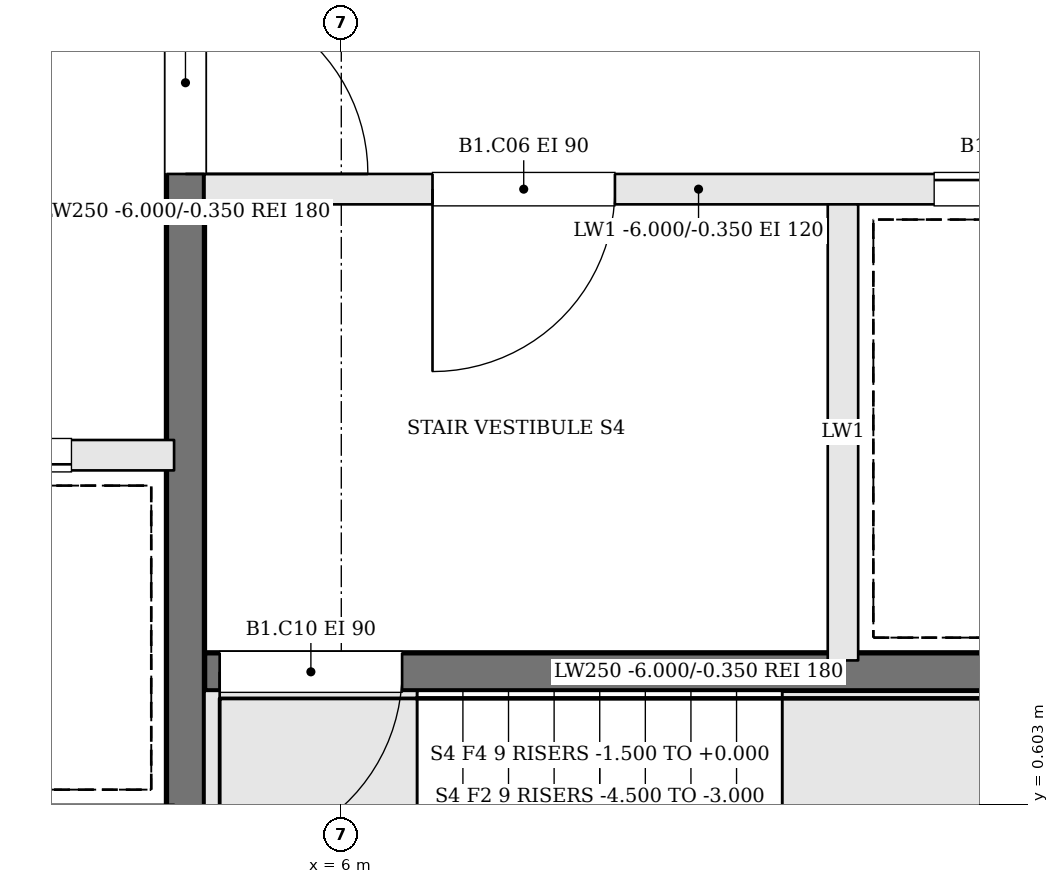
"""IFC4 building model, lengths in metres.
Left out: names, types, materials, properties, quantities, classifications, styles, units other than length and angle.
Written with IfcOpenShell. Run it as: python <this file> out.ifc"""

import sys

from ifc_helpers import new_model, si_unit, direction, frame, frame_2d, origin, place, context, subcontext, project, spatial, rectangle, extrude, element, fill, save


model = new_model("IFC4")
c1 = context("Model", 3, precision=1e-05, world=origin(), true_north=direction((0.0, 1.0)))
c2 = subcontext(c1, "Body", "Model", "MODEL_VIEW")
j1 = project(units=[si_unit("LENGTHUNIT", "METRE"), si_unit("PLANEANGLEUNIT", "RADIAN")], contexts=[c1])
p1 = place(None, origin())
s1 = spatial("IfcSite", under=j1, at=p1, CompositionType="ELEMENT")
p2 = place(p1, origin())
s2 = spatial("IfcBuilding", under=s1, at=p2, CompositionType="ELEMENT")
p3 = place(p2, frame((0.0, 0.0, -6.0)))
s3 = spatial("IfcBuildingStorey", under=s2, at=p3, CompositionType="ELEMENT", Elevation=-6.0)
p4 = place(p3, frame((11.6, 4.65, 0.0), z_axis=(0.0, 0.0, 1.0), x_axis=(-1.0, 0.0, 0.0)))
e1 = element("IfcWall", 1, at=p4, inside=s3, PredefinedType="SOLIDWALL", context=c2, shape_type="SweptSolid", body=[
    extrude(rectangle(XDim=6.5, YDim=0.2, at=frame_2d((3.25, 0.0))), origin(), (0.0, 0.0, 1.0), 5.65),
])
p5 = place(p4, frame((3.8, 0.0, 0.0)))
e2 = element("IfcOpeningElement", 2, at=p5, cuts=e1, PredefinedType="OPENING", context=c2, shape_type="SweptSolid", body=[
    extrude(rectangle(XDim=1.2, YDim=2.1, at=frame_2d((0.6, 1.05))), frame((0.0, 0.11, 0.0), z_axis=(0.0, -1.0, 0.0), x_axis=(1.0, 0.0, 0.0)), (0.0, 0.0, 1.0), 0.22),
])
p6 = place(p4, frame((0.5, 0.0, 0.0)))
e3 = element("IfcOpeningElement", 3, at=p6, cuts=e1, PredefinedType="OPENING", context=c2, shape_type="SweptSolid", body=[
    extrude(rectangle(XDim=1.2, YDim=2.1, at=frame_2d((0.6, 1.05))), frame((0.0, 0.11, 0.0), z_axis=(0.0, -1.0, 0.0), x_axis=(1.0, 0.0, 0.0)), (0.0, 0.0, 1.0), 0.22),
])
p7 = place(p3, frame((11.6, 1.475, 0.0), z_axis=(0.0, 0.0, 1.0), x_axis=(-1.0, 0.0, 0.0)))
e4 = element("IfcWall", 4, at=p7, inside=s3, PredefinedType="SOLIDWALL", context=c2, shape_type="SweptSolid", body=[
    extrude(rectangle(XDim=6.5, YDim=0.25, at=frame_2d((3.25, 0.0))), origin(), (0.0, 0.0, 1.0), 5.65),
])
p8 = place(p7, frame((5.2, 0.0, 0.0)))
e5 = element("IfcOpeningElement", 5, at=p8, cuts=e4, PredefinedType="OPENING", context=c2, shape_type="SweptSolid", body=[
    extrude(rectangle(XDim=1.2, YDim=2.1, at=frame_2d((0.6, 1.05))), frame((0.0, 0.135, 0.0), z_axis=(0.0, -1.0, 0.0), x_axis=(1.0, 0.0, 0.0)), (0.0, 0.0, 1.0), 0.27),
])
p9 = place(p3, frame((9.3, 4.55, 0.0), z_axis=(0.0, 0.0, 1.0), x_axis=(0.0, -1.0, 0.0)))
e6 = element("IfcWall", 6, at=p9, inside=s3, PredefinedType="SOLIDWALL", context=c2, shape_type="SweptSolid", body=[
    extrude(rectangle(XDim=3.0, YDim=0.2, at=frame_2d((1.5, 0.0))), origin(), (0.0, 0.0, 1.0), 5.65),
])
p10 = place(p3, frame((4.975, 10.6, 0.0), z_axis=(0.0, 0.0, 1.0), x_axis=(0.0, -1.0, 0.0)))
e7 = element("IfcWall", 7, at=p10, inside=s3, PredefinedType="SOLIDWALL", context=c2, shape_type="SweptSolid", body=[
    extrude(rectangle(XDim=12.2, YDim=0.25, at=frame_2d((6.1, 0.0))), origin(), (0.0, 0.0, 1.0), 5.65),
])
p11 = place(p10, frame((4.65, 0.0, 0.0)))
e8 = element("IfcOpeningElement", 8, at=p11, cuts=e7, PredefinedType="OPENING", context=c2, shape_type="SweptSolid", body=[
    extrude(rectangle(XDim=1.2, YDim=2.1, at=frame_2d((0.6, 1.05))), frame((0.0, 0.135, 0.0), z_axis=(0.0, -1.0, 0.0), x_axis=(1.0, 0.0, 0.0)), (0.0, 0.0, 1.0), 0.27),
])
p12 = place(p3, frame((-4.9, 2.9, 0.0), z_axis=(0.0, 0.0, 1.0), x_axis=(1.0, 0.0, 0.0)))
e9 = element("IfcWall", 9, at=p12, inside=s3, PredefinedType="SOLIDWALL", context=c2, shape_type="SweptSolid", body=[
    extrude(rectangle(XDim=9.8, YDim=0.2, at=frame_2d((4.9, 0.0))), origin(), (0.0, 0.0, 1.0), 5.65),
])
p13 = place(p12, frame((0.675, 0.0, 0.0)))
e10 = element("IfcOpeningElement", 10, at=p13, cuts=e9, PredefinedType="OPENING", context=c2, shape_type="SweptSolid", body=[
    extrude(rectangle(XDim=1.1, YDim=2.1, at=frame_2d((0.55, 1.05))), frame((0.0, 0.11, 0.0), z_axis=(0.0, -1.0, 0.0), x_axis=(1.0, 0.0, 0.0)), (0.0, 0.0, 1.0), 0.22),
])
p14 = place(p12, frame((3.125, 0.0, 0.0)))
e11 = element("IfcOpeningElement", 11, at=p14, cuts=e9, PredefinedType="OPENING", context=c2, shape_type="SweptSolid", body=[
    extrude(rectangle(XDim=1.1, YDim=2.1, at=frame_2d((0.55, 1.05))), frame((0.0, 0.11, 0.0), z_axis=(0.0, -1.0, 0.0), x_axis=(1.0, 0.0, 0.0)), (0.0, 0.0, 1.0), 0.22),
])
p15 = place(p12, frame((5.575, 0.0, 0.0)))
e12 = element("IfcOpeningElement", 12, at=p15, cuts=e9, PredefinedType="OPENING", context=c2, shape_type="SweptSolid", body=[
    extrude(rectangle(XDim=1.1, YDim=2.1, at=frame_2d((0.55, 1.05))), frame((0.0, 0.11, 0.0), z_axis=(0.0, -1.0, 0.0), x_axis=(1.0, 0.0, 0.0)), (0.0, 0.0, 1.0), 0.22),
])
p16 = place(p12, frame((8.025, 0.0, 0.0)))
e13 = element("IfcOpeningElement", 13, at=p16, cuts=e9, PredefinedType="OPENING", context=c2, shape_type="SweptSolid", body=[
    extrude(rectangle(XDim=1.1, YDim=2.1, at=frame_2d((0.55, 1.05))), frame((0.0, 0.11, 0.0), z_axis=(0.0, -1.0, 0.0), x_axis=(1.0, 0.0, 0.0)), (0.0, 0.0, 1.0), 0.22),
])
p17 = place(p11, origin())
e14 = element("IfcDoor", 14, at=p17, inside=s3, OperationType="SINGLE_SWING_RIGHT", PredefinedType="DOOR", context=c2, shape_type="SweptSolid", body=[
    extrude(rectangle(XDim=1.2, YDim=2.1, at=frame_2d((0.6, 1.05))), frame((0.0, 0.025, 0.0), z_axis=(0.0, -1.0, 0.0), x_axis=(1.0, 0.0, 0.0)), (0.0, 0.0, 1.0), 0.05),
])
fill(e8, e14)
p18 = place(p5, origin())
e15 = element("IfcDoor", 15, at=p18, inside=s3, OperationType="SINGLE_SWING_RIGHT", PredefinedType="DOOR", context=c2, shape_type="SweptSolid", body=[
    extrude(rectangle(XDim=1.2, YDim=2.1, at=frame_2d((0.6, 1.05))), frame((0.0, 0.025, 0.0), z_axis=(0.0, -1.0, 0.0), x_axis=(1.0, 0.0, 0.0)), (0.0, 0.0, 1.0), 0.05),
])
fill(e2, e15)
p19 = place(p8, origin())
e16 = element("IfcDoor", 16, at=p19, inside=s3, OperationType="SINGLE_SWING_RIGHT", PredefinedType="DOOR", context=c2, shape_type="SweptSolid", body=[
    extrude(rectangle(XDim=1.2, YDim=2.1, at=frame_2d((0.6, 1.05))), frame((0.0, 0.025, 0.0), z_axis=(0.0, -1.0, 0.0), x_axis=(1.0, 0.0, 0.0)), (0.0, 0.0, 1.0), 0.05),
])
fill(e5, e16)
p20 = place(p6, origin())
e17 = element("IfcDoor", 17, at=p20, inside=s3, OperationType="SLIDING_TO_RIGHT", PredefinedType="DOOR", context=c2, shape_type="SweptSolid", body=[
    extrude(rectangle(XDim=1.2, YDim=2.1, at=frame_2d((0.6, 1.05))), frame((0.0, 0.025, 0.0), z_axis=(0.0, -1.0, 0.0), x_axis=(1.0, 0.0, 0.0)), (0.0, 0.0, 1.0), 0.05),
])
fill(e3, e17)
p21 = place(p16, origin())
e18 = element("IfcDoor", 18, at=p21, inside=s3, OperationType="SLIDING_TO_RIGHT", PredefinedType="DOOR", context=c2, shape_type="SweptSolid", body=[
    extrude(rectangle(XDim=1.1, YDim=2.1, at=frame_2d((0.55, 1.05))), frame((0.0, 0.025, 0.0), z_axis=(0.0, -1.0, 0.0), x_axis=(1.0, 0.0, 0.0)), (0.0, 0.0, 1.0), 0.05),
])
fill(e13, e18)
save(model, sys.argv[1])
